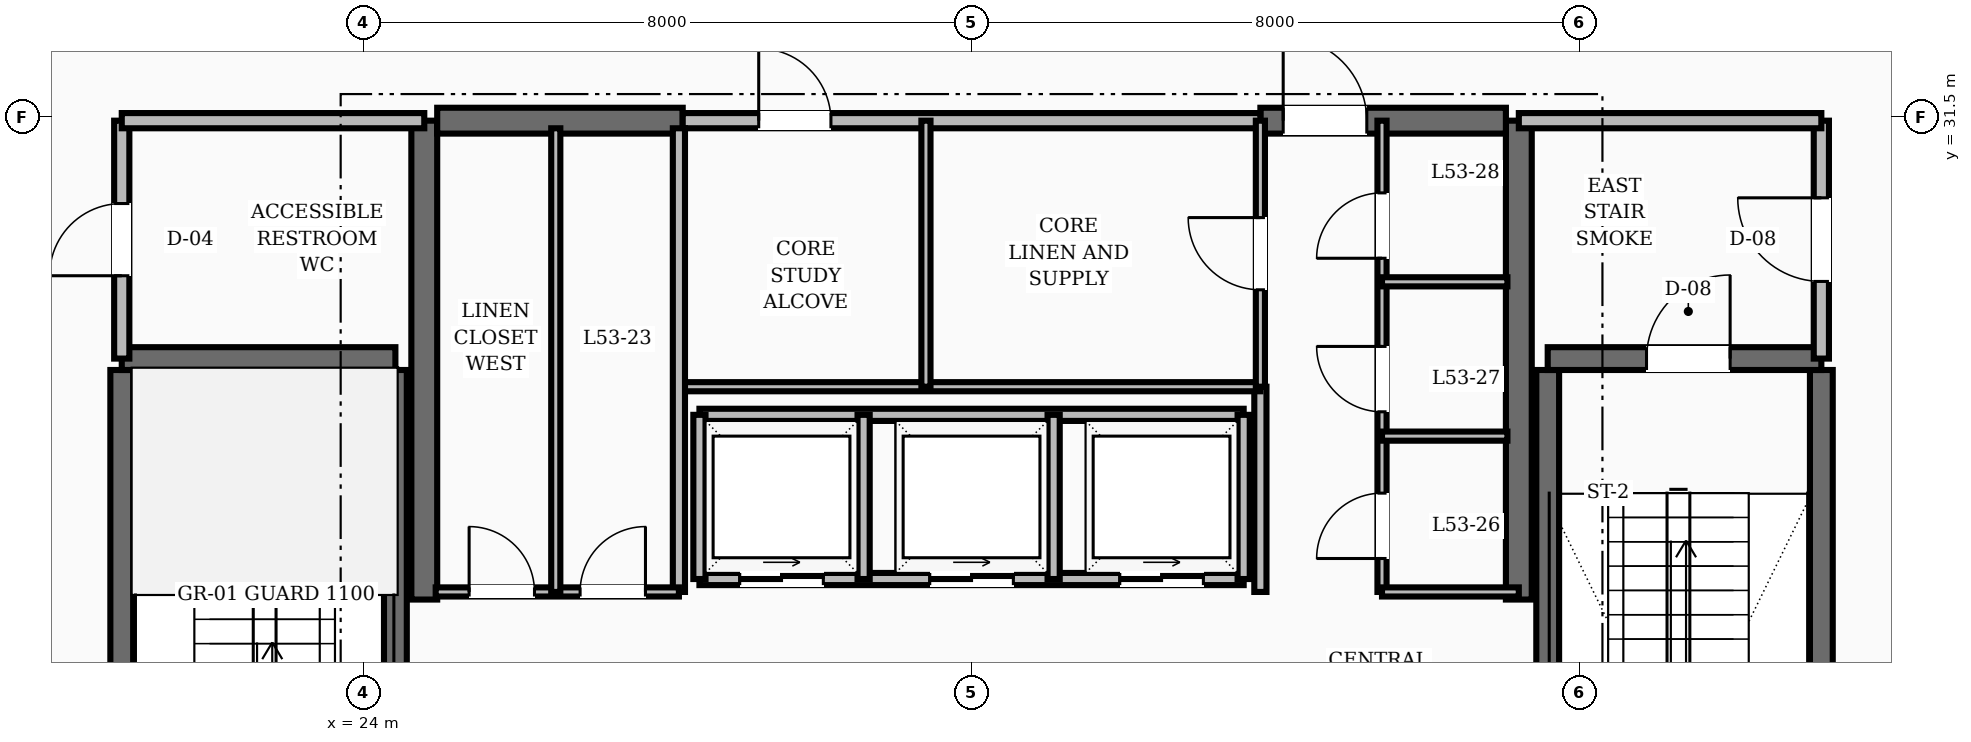
"""IFC4 building model, lengths in metres.
Left out: names, types, materials, properties, quantities, classifications, styles, units other than length and angle.
Written with IfcOpenShell. Run it as: python <this file> out.ifc"""

import sys

from ifc_helpers import new_model, si_unit, direction, frame, frame_2d, origin, place, context, subcontext, project, spatial, rectangle, extrude, element, fill, save


model = new_model("IFC4")
c1 = context("Model", 3, precision=1e-05, world=origin(), true_north=direction((0.0, 1.0)))
c2 = subcontext(c1, "Body", "Model", "MODEL_VIEW")
j1 = project(units=[si_unit("LENGTHUNIT", "METRE"), si_unit("PLANEANGLEUNIT", "RADIAN")], contexts=[c1])
p1 = place(None, origin())
s1 = spatial("IfcSite", under=j1, at=p1, CompositionType="ELEMENT")
p2 = place(p1, origin())
s2 = spatial("IfcBuilding", under=s1, at=p2, CompositionType="ELEMENT")
p3 = place(p2, frame((0.0, 0.0, 203.6)))
s3 = spatial("IfcBuildingStorey", under=s2, at=p3, CompositionType="ELEMENT", Elevation=203.6)
for number, where, z_axis, x_axis in (
    (1, (24.8, 25.15, 0.0), (0.0, 0.0, 1.0), (0.0, 1.0, 0.0)),
    (2, (39.2, 25.15, 0.0), (0.0, 0.0, 1.0), (0.0, 1.0, 0.0)),
):
    element("IfcWall", number, at=place(p3, frame(where, z_axis=z_axis, x_axis=x_axis)), inside=s3, PredefinedType="SHEAR", context=c2, shape_type="SweptSolid", body=[
        extrude(rectangle(XDim=6.3, YDim=0.34, at=frame_2d((3.15, 0.0))), origin(), (0.0, 0.0, 1.0), 4.8),
    ])
p4 = place(p3, frame((24.97, 31.45, 0.0), z_axis=(0.0, 0.0, 1.0), x_axis=(1.0, 0.0, 0.0)))
e3 = element("IfcWall", 3, at=p4, inside=s3, PredefinedType="SHEAR", context=c2, shape_type="SweptSolid", body=[
    extrude(rectangle(XDim=3.23, YDim=0.34, at=frame_2d((1.615, 0.0))), origin(), (0.0, 0.0, 1.0), 4.8),
])
p5 = place(p3, frame((35.8, 31.45, 0.0), z_axis=(0.0, 0.0, 1.0), x_axis=(1.0, 0.0, 0.0)))
e4 = element("IfcWall", 4, at=p5, inside=s3, PredefinedType="SHEAR", context=c2, shape_type="SweptSolid", body=[
    extrude(rectangle(XDim=3.23, YDim=0.34, at=frame_2d((1.615, 0.0))), origin(), (0.0, 0.0, 1.0), 4.8),
])
p6 = place(p5, frame((0.3, 0.0, 0.0)))
e5 = element("IfcOpeningElement", 5, at=p6, cuts=e4, PredefinedType="OPENING", context=c2, shape_type="SweptSolid", body=[
    extrude(rectangle(XDim=1.1, YDim=2.1, at=frame_2d((0.55, 1.05))), frame((0.0, 0.18, 0.0), z_axis=(0.0, -1.0, 0.0), x_axis=(1.0, 0.0, 0.0)), (0.0, 0.0, 1.0), 0.36),
])
for number, where, z_axis, x_axis in (
    (6, (20.82, 19.43, 0.0), (0.0, 0.0, 1.0), (0.0, 1.0, 0.0)),
    (7, (24.42, 19.43, 0.0), (0.0, 0.0, 1.0), (0.0, 1.0, 0.0)),
):
    element("IfcWall", number, at=place(p3, frame(where, z_axis=z_axis, x_axis=x_axis)), inside=s3, PredefinedType="SHEAR", context=c2, shape_type="SweptSolid", body=[
        extrude(rectangle(XDim=8.74, YDim=0.3, at=frame_2d((4.37, 0.0))), origin(), (0.0, 0.0, 1.0), 4.8),
    ])
p7 = place(p3, frame((20.82, 28.32, 0.0), z_axis=(0.0, 0.0, 1.0), x_axis=(1.0, 0.0, 0.0)))
e8 = element("IfcWall", 8, at=p7, inside=s3, PredefinedType="SHEAR", context=c2, shape_type="SweptSolid", body=[
    extrude(rectangle(XDim=3.6, YDim=0.3, at=frame_2d((1.8, 0.0))), origin(), (0.0, 0.0, 1.0), 4.8),
])
for number, where, z_axis, x_axis in (
    (9, (43.18, 19.43, 0.0), (0.0, 0.0, 1.0), (0.0, 1.0, 0.0)),
    (10, (39.58, 19.43, 0.0), (0.0, 0.0, 1.0), (0.0, 1.0, 0.0)),
):
    element("IfcWall", number, at=place(p3, frame(where, z_axis=z_axis, x_axis=x_axis)), inside=s3, PredefinedType="SHEAR", context=c2, shape_type="SweptSolid", body=[
        extrude(rectangle(XDim=8.74, YDim=0.3, at=frame_2d((4.37, 0.0))), origin(), (0.0, 0.0, 1.0), 4.8),
    ])
p8 = place(p3, frame((39.58, 28.32, 0.0), z_axis=(0.0, 0.0, 1.0), x_axis=(1.0, 0.0, 0.0)))
e11 = element("IfcWall", 11, at=p8, inside=s3, PredefinedType="SHEAR", context=c2, shape_type="SweptSolid", body=[
    extrude(rectangle(XDim=3.6, YDim=0.3, at=frame_2d((1.8, 0.0))), origin(), (0.0, 0.0, 1.0), 4.8),
])
p9 = place(p8, frame((1.3, 0.0, 0.0)))
e12 = element("IfcOpeningElement", 12, at=p9, cuts=e11, PredefinedType="OPENING", context=c2, shape_type="SweptSolid", body=[
    extrude(rectangle(XDim=1.1, YDim=2.1, at=frame_2d((0.55, 1.05))), frame((0.0, 0.16, 0.0), z_axis=(0.0, -1.0, 0.0), x_axis=(1.0, 0.0, 0.0)), (0.0, 0.0, 1.0), 0.32),
])
p10 = place(p3, frame((43.18, 28.32, 0.0), z_axis=(0.0, 0.0, 1.0), x_axis=(0.0, 1.0, 0.0)))
e13 = element("IfcWall", 13, at=p10, inside=s3, PredefinedType="SOLIDWALL", context=c2, shape_type="SweptSolid", body=[
    extrude(rectangle(XDim=3.13, YDim=0.2, at=frame_2d((1.565, 0.0))), origin(), (0.0, 0.0, 1.0), 3.71),
])
p11 = place(p10, frame((1.015, 0.0, 0.0)))
e14 = element("IfcOpeningElement", 14, at=p11, cuts=e13, PredefinedType="OPENING", context=c2, shape_type="SweptSolid", body=[
    extrude(rectangle(XDim=1.1, YDim=2.1, at=frame_2d((0.55, 1.05))), frame((0.0, 0.11, 0.0), z_axis=(0.0, -1.0, 0.0), x_axis=(1.0, 0.0, 0.0)), (0.0, 0.0, 1.0), 0.22),
])
p12 = place(p3, frame((39.2, 31.45, 0.0), z_axis=(0.0, 0.0, 1.0), x_axis=(1.0, 0.0, 0.0)))
e15 = element("IfcWall", 15, at=p12, inside=s3, PredefinedType="SOLIDWALL", context=c2, shape_type="SweptSolid", body=[
    extrude(rectangle(XDim=3.98, YDim=0.2, at=frame_2d((1.99, 0.0))), origin(), (0.0, 0.0, 1.0), 3.71),
])
p13 = place(p3, frame((20.82, 28.32, 0.0), z_axis=(0.0, 0.0, 1.0), x_axis=(0.0, 1.0, 0.0)))
e16 = element("IfcWall", 16, at=p13, inside=s3, PredefinedType="SOLIDWALL", context=c2, shape_type="SweptSolid", body=[
    extrude(rectangle(XDim=3.13, YDim=0.2, at=frame_2d((1.565, 0.0))), origin(), (0.0, 0.0, 1.0), 3.71),
])
p14 = place(p13, frame((1.09, 0.0, 0.0)))
e17 = element("IfcOpeningElement", 17, at=p14, cuts=e16, PredefinedType="OPENING", context=c2, shape_type="SweptSolid", body=[
    extrude(rectangle(XDim=0.95, YDim=2.1, at=frame_2d((0.475, 1.05))), frame((0.0, 0.11, 0.0), z_axis=(0.0, -1.0, 0.0), x_axis=(1.0, 0.0, 0.0)), (0.0, 0.0, 1.0), 0.22),
])
p15 = place(p3, frame((20.82, 31.45, 0.0), z_axis=(0.0, 0.0, 1.0), x_axis=(1.0, 0.0, 0.0)))
e18 = element("IfcWall", 18, at=p15, inside=s3, PredefinedType="SOLIDWALL", context=c2, shape_type="SweptSolid", body=[
    extrude(rectangle(XDim=3.98, YDim=0.2, at=frame_2d((1.99, 0.0))), origin(), (0.0, 0.0, 1.0), 3.71),
])
p16 = place(p3, frame((35.8, 25.25, 0.0), z_axis=(0.0, 0.0, 1.0), x_axis=(0.0, 1.0, 0.0)))
e19 = element("IfcWall", 19, at=p16, inside=s3, PredefinedType="SOLIDWALL", context=c2, shape_type="SweptSolid", body=[
    extrude(rectangle(XDim=2.7, YDim=0.16, at=frame_2d((1.35, 0.0))), origin(), (0.0, 0.0, 1.0), 3.71),
])
p17 = place(p3, frame((28.42, 25.42, 0.0), z_axis=(0.0, 0.0, 1.0), x_axis=(1.0, 0.0, 0.0)))
e20 = element("IfcWall", 20, at=p17, inside=s3, PredefinedType="SOLIDWALL", context=c2, shape_type="SweptSolid", body=[
    extrude(rectangle(XDim=7.16, YDim=0.16, at=frame_2d((3.58, 0.0))), origin(), (0.0, 0.0, 1.0), 3.71),
])
p18 = place(p17, frame((0.53, 0.0, 0.0)))
e21 = element("IfcOpeningElement", 21, at=p18, cuts=e20, PredefinedType="OPENING", context=c2, shape_type="SweptSolid", body=[
    extrude(rectangle(XDim=1.1, YDim=2.15, at=frame_2d((0.55, 1.075))), frame((0.0, 0.09, 0.0), z_axis=(0.0, -1.0, 0.0), x_axis=(1.0, 0.0, 0.0)), (0.0, 0.0, 1.0), 0.18),
])
p19 = place(p17, frame((3.03, 0.0, 0.0)))
e22 = element("IfcOpeningElement", 22, at=p19, cuts=e20, PredefinedType="OPENING", context=c2, shape_type="SweptSolid", body=[
    extrude(rectangle(XDim=1.1, YDim=2.15, at=frame_2d((0.55, 1.075))), frame((0.0, 0.09, 0.0), z_axis=(0.0, -1.0, 0.0), x_axis=(1.0, 0.0, 0.0)), (0.0, 0.0, 1.0), 0.18),
])
p20 = place(p17, frame((5.53, 0.0, 0.0)))
e23 = element("IfcOpeningElement", 23, at=p20, cuts=e20, PredefinedType="OPENING", context=c2, shape_type="SweptSolid", body=[
    extrude(rectangle(XDim=1.1, YDim=2.15, at=frame_2d((0.55, 1.075))), frame((0.0, 0.09, 0.0), z_axis=(0.0, -1.0, 0.0), x_axis=(1.0, 0.0, 0.0)), (0.0, 0.0, 1.0), 0.18),
])
p21 = place(p3, frame((28.42, 27.58, 0.0), z_axis=(0.0, 0.0, 1.0), x_axis=(1.0, 0.0, 0.0)))
e24 = element("IfcWall", 24, at=p21, inside=s3, PredefinedType="SOLIDWALL", context=c2, shape_type="SweptSolid", body=[
    extrude(rectangle(XDim=7.16, YDim=0.16, at=frame_2d((3.58, 0.0))), origin(), (0.0, 0.0, 1.0), 3.71),
])
for number, where, z_axis, x_axis in (
    (25, (28.42, 25.42, 0.0), (0.0, 0.0, 1.0), (0.0, 1.0, 0.0)),
    (26, (30.58, 25.42, 0.0), (0.0, 0.0, 1.0), (0.0, 1.0, 0.0)),
    (27, (33.08, 25.42, 0.0), (0.0, 0.0, 1.0), (0.0, 1.0, 0.0)),
    (28, (35.58, 25.42, 0.0), (0.0, 0.0, 1.0), (0.0, 1.0, 0.0)),
):
    element("IfcWall", number, at=place(p3, frame(where, z_axis=z_axis, x_axis=x_axis)), inside=s3, PredefinedType="SOLIDWALL", context=c2, shape_type="SweptSolid", body=[
        extrude(rectangle(XDim=2.16, YDim=0.16, at=frame_2d((1.08, 0.0))), origin(), (0.0, 0.0, 1.0), 3.71),
    ])
p22 = place(p3, frame((28.2, 31.45, 0.0), z_axis=(0.0, 0.0, 1.0), x_axis=(1.0, 0.0, 0.0)))
e29 = element("IfcWall", 29, at=p22, inside=s3, PredefinedType="SOLIDWALL", context=c2, shape_type="SweptSolid", body=[
    extrude(rectangle(XDim=7.6, YDim=0.2, at=frame_2d((3.8, 0.0))), origin(), (0.0, 0.0, 1.0), 3.71),
])
p23 = place(p22, frame((1.0, 0.0, 0.0)))
e30 = element("IfcOpeningElement", 30, at=p23, cuts=e29, PredefinedType="OPENING", context=c2, shape_type="SweptSolid", body=[
    extrude(rectangle(XDim=0.95, YDim=2.1, at=frame_2d((0.475, 1.05))), frame((0.0, 0.11, 0.0), z_axis=(0.0, -1.0, 0.0), x_axis=(1.0, 0.0, 0.0)), (0.0, 0.0, 1.0), 0.22),
])
p24 = place(p3, frame((28.2, 27.95, 0.0), z_axis=(0.0, 0.0, 1.0), x_axis=(1.0, 0.0, 0.0)))
e31 = element("IfcWall", 31, at=p24, inside=s3, PredefinedType="PARTITIONING", context=c2, shape_type="SweptSolid", body=[
    extrude(rectangle(XDim=7.6, YDim=0.12, at=frame_2d((3.8, 0.0))), origin(), (0.0, 0.0, 1.0), 3.71),
])
p25 = place(p3, frame((35.8, 27.95, 0.0), z_axis=(0.0, 0.0, 1.0), x_axis=(0.0, 1.0, 0.0)))
e32 = element("IfcWall", 32, at=p25, inside=s3, PredefinedType="PARTITIONING", context=c2, shape_type="SweptSolid", body=[
    extrude(rectangle(XDim=3.5, YDim=0.12, at=frame_2d((1.75, 0.0))), origin(), (0.0, 0.0, 1.0), 3.71),
])
p26 = place(p25, frame((1.275, 0.0, 0.0)))
e33 = element("IfcOpeningElement", 33, at=p26, cuts=e32, PredefinedType="OPENING", context=c2, shape_type="SweptSolid", body=[
    extrude(rectangle(XDim=0.95, YDim=2.1, at=frame_2d((0.475, 1.05))), frame((0.0, 0.07, 0.0), z_axis=(0.0, -1.0, 0.0), x_axis=(1.0, 0.0, 0.0)), (0.0, 0.0, 1.0), 0.14),
])
p27 = place(p3, frame((31.4, 27.95, 0.0), z_axis=(0.0, 0.0, 1.0), x_axis=(0.0, 1.0, 0.0)))
e34 = element("IfcWall", 34, at=p27, inside=s3, PredefinedType="PARTITIONING", context=c2, shape_type="SweptSolid", body=[
    extrude(rectangle(XDim=3.5, YDim=0.12, at=frame_2d((1.75, 0.0))), origin(), (0.0, 0.0, 1.0), 3.71),
])
p28 = place(p3, frame((28.15, 25.25, 0.0), z_axis=(0.0, 0.0, 1.0), x_axis=(0.0, 1.0, 0.0)))
e35 = element("IfcWall", 35, at=p28, inside=s3, PredefinedType="SOLIDWALL", context=c2, shape_type="SweptSolid", body=[
    extrude(rectangle(XDim=6.1, YDim=0.16, at=frame_2d((3.05, 0.0))), origin(), (0.0, 0.0, 1.0), 3.71),
])
p29 = place(p3, frame((24.95, 25.25, 0.0), z_axis=(0.0, 0.0, 1.0), x_axis=(1.0, 0.0, 0.0)))
e36 = element("IfcWall", 36, at=p29, inside=s3, PredefinedType="PARTITIONING", context=c2, shape_type="SweptSolid", body=[
    extrude(rectangle(XDim=3.2, YDim=0.12, at=frame_2d((1.6, 0.0))), origin(), (0.0, 0.0, 1.0), 3.71),
])
p30 = place(p29, frame((0.44, 0.0, 0.0)))
e37 = element("IfcOpeningElement", 37, at=p30, cuts=e36, PredefinedType="OPENING", context=c2, shape_type="SweptSolid", body=[
    extrude(rectangle(XDim=0.86, YDim=2.1, at=frame_2d((0.43, 1.05))), frame((0.0, 0.07, 0.0), z_axis=(0.0, -1.0, 0.0), x_axis=(1.0, 0.0, 0.0)), (0.0, 0.0, 1.0), 0.14),
])
p31 = place(p29, frame((1.9, 0.0, 0.0)))
e38 = element("IfcOpeningElement", 38, at=p31, cuts=e36, PredefinedType="OPENING", context=c2, shape_type="SweptSolid", body=[
    extrude(rectangle(XDim=0.86, YDim=2.1, at=frame_2d((0.43, 1.05))), frame((0.0, 0.07, 0.0), z_axis=(0.0, -1.0, 0.0), x_axis=(1.0, 0.0, 0.0)), (0.0, 0.0, 1.0), 0.14),
])
p32 = place(p3, frame((37.4, 25.25, 0.0), z_axis=(0.0, 0.0, 1.0), x_axis=(0.0, 1.0, 0.0)))
e39 = element("IfcWall", 39, at=p32, inside=s3, PredefinedType="PARTITIONING", context=c2, shape_type="SweptSolid", body=[
    extrude(rectangle(XDim=6.2, YDim=0.12, at=frame_2d((3.1, 0.0))), origin(), (0.0, 0.0, 1.0), 3.71),
])
p33 = place(p32, frame((0.44, 0.0, 0.0)))
e40 = element("IfcOpeningElement", 40, at=p33, cuts=e39, PredefinedType="OPENING", context=c2, shape_type="SweptSolid", body=[
    extrude(rectangle(XDim=0.86, YDim=2.1, at=frame_2d((0.43, 1.05))), frame((0.0, 0.07, 0.0), z_axis=(0.0, -1.0, 0.0), x_axis=(1.0, 0.0, 0.0)), (0.0, 0.0, 1.0), 0.14),
])
p34 = place(p32, frame((2.37, 0.0, 0.0)))
e41 = element("IfcOpeningElement", 41, at=p34, cuts=e39, PredefinedType="OPENING", context=c2, shape_type="SweptSolid", body=[
    extrude(rectangle(XDim=0.86, YDim=2.1, at=frame_2d((0.43, 1.05))), frame((0.0, 0.07, 0.0), z_axis=(0.0, -1.0, 0.0), x_axis=(1.0, 0.0, 0.0)), (0.0, 0.0, 1.0), 0.14),
])
p35 = place(p32, frame((4.39, 0.0, 0.0)))
e42 = element("IfcOpeningElement", 42, at=p35, cuts=e39, PredefinedType="OPENING", context=c2, shape_type="SweptSolid", body=[
    extrude(rectangle(XDim=0.86, YDim=2.1, at=frame_2d((0.43, 1.05))), frame((0.0, 0.07, 0.0), z_axis=(0.0, -1.0, 0.0), x_axis=(1.0, 0.0, 0.0)), (0.0, 0.0, 1.0), 0.14),
])
p36 = place(p3, frame((37.4, 25.25, 0.0), z_axis=(0.0, 0.0, 1.0), x_axis=(1.0, 0.0, 0.0)))
e43 = element("IfcWall", 43, at=p36, inside=s3, PredefinedType="PARTITIONING", context=c2, shape_type="SweptSolid", body=[
    extrude(rectangle(XDim=1.8, YDim=0.12, at=frame_2d((0.9, 0.0))), origin(), (0.0, 0.0, 1.0), 3.71),
])
p37 = place(p3, frame((26.53, 25.25, 0.0), z_axis=(0.0, 0.0, 1.0), x_axis=(0.0, 1.0, 0.0)))
e44 = element("IfcWall", 44, at=p37, inside=s3, PredefinedType="PARTITIONING", context=c2, shape_type="SweptSolid", body=[
    extrude(rectangle(XDim=6.1, YDim=0.12, at=frame_2d((3.05, 0.0))), origin(), (0.0, 0.0, 1.0), 3.71),
])
for number, where, z_axis, x_axis in (
    (45, (37.4, 27.3, 0.0), (0.0, 0.0, 1.0), (1.0, 0.0, 0.0)),
    (46, (37.4, 29.33, 0.0), (0.0, 0.0, 1.0), (1.0, 0.0, 0.0)),
):
    element("IfcWall", number, at=place(p3, frame(where, z_axis=z_axis, x_axis=x_axis)), inside=s3, PredefinedType="PARTITIONING", context=c2, shape_type="SweptSolid", body=[
        extrude(rectangle(XDim=1.65, YDim=0.12, at=frame_2d((0.825, 0.0))), origin(), (0.0, 0.0, 1.0), 3.71),
    ])
for number, where, z_axis, x_axis in (
    (47, (44.846, 31.833, 0.0), (0.0, 0.0, 1.0), (-0.669, 0.744, 0.0)),
    (48, (21.075, 33.97, 0.0), (0.0, 0.0, 1.0), (-0.669, -0.744, 0.0)),
):
    element("IfcWall", number, at=place(p3, frame(where, z_axis=z_axis, x_axis=x_axis)), inside=s3, PredefinedType="SOLIDWALL", context=c2, shape_type="SweptSolid", body=[
        extrude(rectangle(XDim=2.874, YDim=0.16, at=frame_2d((1.437, 0.0))), origin(), (0.0, 0.0, 1.0), 3.71),
    ])
p38 = place(p9, origin())
e49 = element("IfcDoor", 49, at=p38, inside=s3, OperationType="SINGLE_SWING_RIGHT", PredefinedType="DOOR", context=c2, shape_type="SweptSolid", body=[
    extrude(rectangle(XDim=1.1, YDim=2.1, at=frame_2d((0.55, 1.05))), frame((0.0, 0.025, 0.0), z_axis=(0.0, -1.0, 0.0), x_axis=(1.0, 0.0, 0.0)), (0.0, 0.0, 1.0), 0.05),
])
fill(e12, e49)
p39 = place(p11, origin())
e50 = element("IfcDoor", 50, at=p39, inside=s3, OperationType="SINGLE_SWING_RIGHT", PredefinedType="DOOR", context=c2, shape_type="SweptSolid", body=[
    extrude(rectangle(XDim=1.1, YDim=2.1, at=frame_2d((0.55, 1.05))), frame((0.0, 0.025, 0.0), z_axis=(0.0, -1.0, 0.0), x_axis=(1.0, 0.0, 0.0)), (0.0, 0.0, 1.0), 0.05),
])
fill(e14, e50)
p40 = place(p14, origin())
e51 = element("IfcDoor", 51, at=p40, inside=s3, OperationType="SINGLE_SWING_LEFT", PredefinedType="DOOR", context=c2, shape_type="SweptSolid", body=[
    extrude(rectangle(XDim=0.95, YDim=2.1, at=frame_2d((0.475, 1.05))), frame((0.0, 0.025, 0.0), z_axis=(0.0, -1.0, 0.0), x_axis=(1.0, 0.0, 0.0)), (0.0, 0.0, 1.0), 0.05),
])
fill(e17, e51)
p41 = place(p6, origin())
e52 = element("IfcDoor", 52, at=p41, inside=s3, OperationType="SINGLE_SWING_LEFT", PredefinedType="DOOR", context=c2, shape_type="SweptSolid", body=[
    extrude(rectangle(XDim=1.1, YDim=2.1, at=frame_2d((0.55, 1.05))), frame((0.0, 0.025, 0.0), z_axis=(0.0, -1.0, 0.0), x_axis=(1.0, 0.0, 0.0)), (0.0, 0.0, 1.0), 0.05),
])
fill(e5, e52)
p42 = place(p18, origin())
e53 = element("IfcDoor", 53, at=p42, inside=s3, OperationType="SLIDING_TO_RIGHT", PredefinedType="DOOR", context=c2, shape_type="SweptSolid", body=[
    extrude(rectangle(XDim=1.1, YDim=2.15, at=frame_2d((0.55, 1.075))), frame((0.0, 0.025, 0.0), z_axis=(0.0, -1.0, 0.0), x_axis=(1.0, 0.0, 0.0)), (0.0, 0.0, 1.0), 0.05),
])
fill(e21, e53)
p43 = place(p19, origin())
e54 = element("IfcDoor", 54, at=p43, inside=s3, OperationType="SLIDING_TO_RIGHT", PredefinedType="DOOR", context=c2, shape_type="SweptSolid", body=[
    extrude(rectangle(XDim=1.1, YDim=2.15, at=frame_2d((0.55, 1.075))), frame((0.0, 0.025, 0.0), z_axis=(0.0, -1.0, 0.0), x_axis=(1.0, 0.0, 0.0)), (0.0, 0.0, 1.0), 0.05),
])
fill(e22, e54)
p44 = place(p20, origin())
e55 = element("IfcDoor", 55, at=p44, inside=s3, OperationType="SLIDING_TO_RIGHT", PredefinedType="DOOR", context=c2, shape_type="SweptSolid", body=[
    extrude(rectangle(XDim=1.1, YDim=2.15, at=frame_2d((0.55, 1.075))), frame((0.0, 0.025, 0.0), z_axis=(0.0, -1.0, 0.0), x_axis=(1.0, 0.0, 0.0)), (0.0, 0.0, 1.0), 0.05),
])
fill(e23, e55)
p45 = place(p23, origin())
e56 = element("IfcDoor", 56, at=p45, inside=s3, OperationType="SINGLE_SWING_LEFT", PredefinedType="DOOR", context=c2, shape_type="SweptSolid", body=[
    extrude(rectangle(XDim=0.95, YDim=2.1, at=frame_2d((0.475, 1.05))), frame((0.0, 0.025, 0.0), z_axis=(0.0, -1.0, 0.0), x_axis=(1.0, 0.0, 0.0)), (0.0, 0.0, 1.0), 0.05),
])
fill(e30, e56)
p46 = place(p26, origin())
e57 = element("IfcDoor", 57, at=p46, inside=s3, OperationType="SINGLE_SWING_RIGHT", PredefinedType="DOOR", context=c2, shape_type="SweptSolid", body=[
    extrude(rectangle(XDim=0.95, YDim=2.1, at=frame_2d((0.475, 1.05))), frame((0.0, 0.025, 0.0), z_axis=(0.0, -1.0, 0.0), x_axis=(1.0, 0.0, 0.0)), (0.0, 0.0, 1.0), 0.05),
])
fill(e33, e57)
p47 = place(p30, origin())
e58 = element("IfcDoor", 58, at=p47, inside=s3, OperationType="SINGLE_SWING_LEFT", PredefinedType="DOOR", context=c2, shape_type="SweptSolid", body=[
    extrude(rectangle(XDim=0.86, YDim=2.1, at=frame_2d((0.43, 1.05))), frame((0.0, 0.025, 0.0), z_axis=(0.0, -1.0, 0.0), x_axis=(1.0, 0.0, 0.0)), (0.0, 0.0, 1.0), 0.05),
])
fill(e37, e58)
p48 = place(p31, origin())
e59 = element("IfcDoor", 59, at=p48, inside=s3, OperationType="SINGLE_SWING_RIGHT", PredefinedType="DOOR", context=c2, shape_type="SweptSolid", body=[
    extrude(rectangle(XDim=0.86, YDim=2.1, at=frame_2d((0.43, 1.05))), frame((0.0, 0.025, 0.0), z_axis=(0.0, -1.0, 0.0), x_axis=(1.0, 0.0, 0.0)), (0.0, 0.0, 1.0), 0.05),
])
fill(e38, e59)
p49 = place(p33, origin())
e60 = element("IfcDoor", 60, at=p49, inside=s3, OperationType="SINGLE_SWING_LEFT", PredefinedType="DOOR", context=c2, shape_type="SweptSolid", body=[
    extrude(rectangle(XDim=0.86, YDim=2.1, at=frame_2d((0.43, 1.05))), frame((0.0, 0.025, 0.0), z_axis=(0.0, -1.0, 0.0), x_axis=(1.0, 0.0, 0.0)), (0.0, 0.0, 1.0), 0.05),
])
fill(e40, e60)
p50 = place(p34, origin())
e61 = element("IfcDoor", 61, at=p50, inside=s3, OperationType="SINGLE_SWING_RIGHT", PredefinedType="DOOR", context=c2, shape_type="SweptSolid", body=[
    extrude(rectangle(XDim=0.86, YDim=2.1, at=frame_2d((0.43, 1.05))), frame((0.0, 0.025, 0.0), z_axis=(0.0, -1.0, 0.0), x_axis=(1.0, 0.0, 0.0)), (0.0, 0.0, 1.0), 0.05),
])
fill(e41, e61)
p51 = place(p35, origin())
e62 = element("IfcDoor", 62, at=p51, inside=s3, OperationType="SINGLE_SWING_LEFT", PredefinedType="DOOR", context=c2, shape_type="SweptSolid", body=[
    extrude(rectangle(XDim=0.86, YDim=2.1, at=frame_2d((0.43, 1.05))), frame((0.0, 0.025, 0.0), z_axis=(0.0, -1.0, 0.0), x_axis=(1.0, 0.0, 0.0)), (0.0, 0.0, 1.0), 0.05),
])
fill(e42, e62)
save(model, sys.argv[1])
